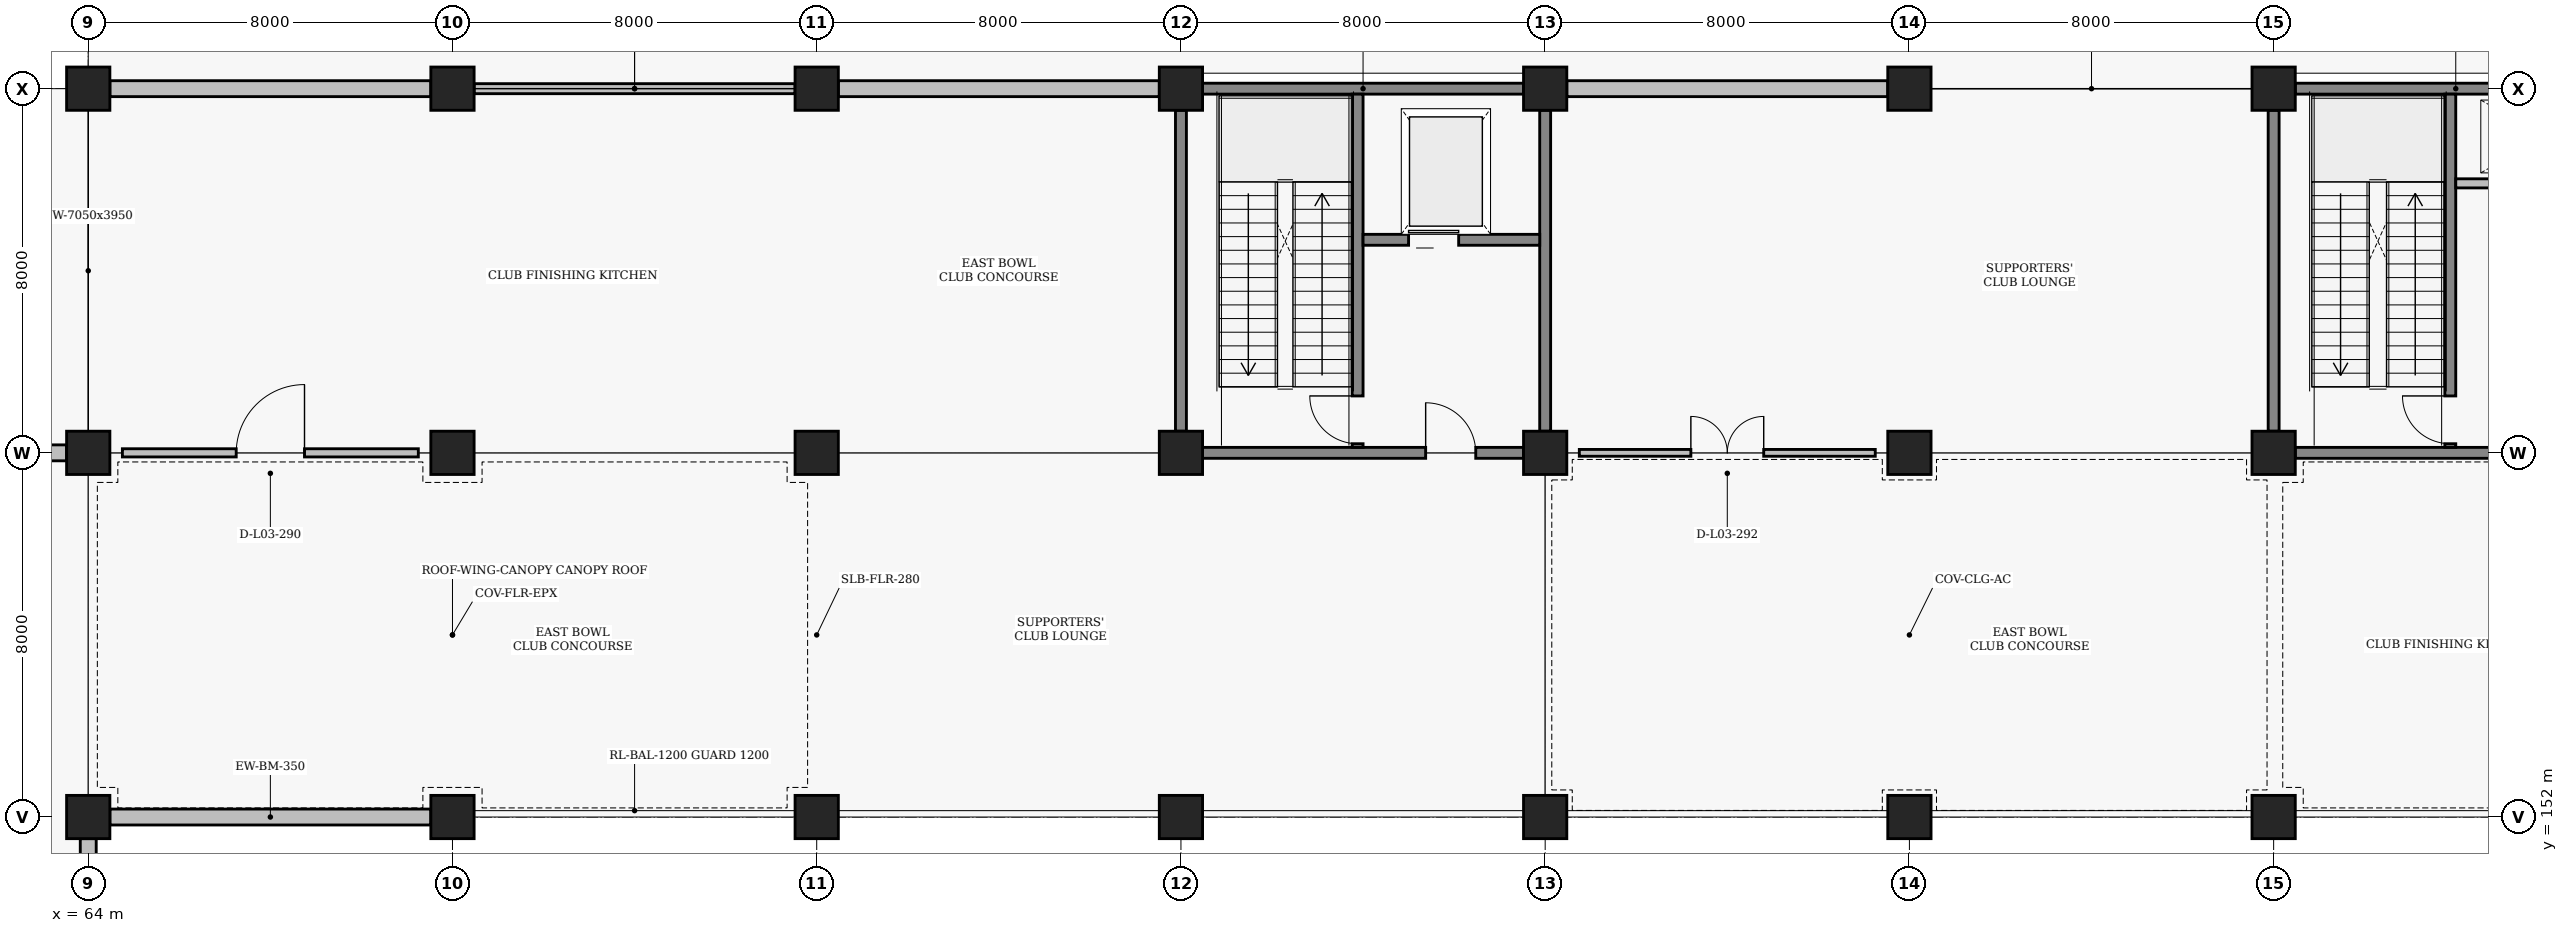
"""IFC4 building model, lengths in metres.
Left out: names, types, materials, properties, quantities, classifications, styles, units other than length and angle.
Written with IfcOpenShell. Run it as: python <this file> out.ifc"""

import sys

from ifc_helpers import new_model, si_unit, direction, frame, frame_2d, origin, origin_2d, place, context, subcontext, project, spatial, rectangle, extrude, element, fill, save


model = new_model("IFC4")
c1 = context("Model", 3, precision=1e-05, world=origin(), true_north=direction((0.0, 1.0)))
c2 = subcontext(c1, "Body", "Model", "MODEL_VIEW")
j1 = project(units=[si_unit("LENGTHUNIT", "METRE"), si_unit("PLANEANGLEUNIT", "RADIAN")], contexts=[c1])
p1 = place(None, origin())
s1 = spatial("IfcSite", under=j1, at=p1, CompositionType="ELEMENT")
p2 = place(p1, origin())
s2 = spatial("IfcBuilding", under=s1, at=p2, CompositionType="ELEMENT")
p3 = place(p2, frame((0.0, 0.0, 9.6)))
s3 = spatial("IfcBuildingStorey", under=s2, at=p3, CompositionType="ELEMENT", Elevation=9.6)
for number, where, z_axis, x_axis in (
    (1, (64.0, 152.0, 0.0), (0.0, 0.0, 1.0), (1.0, 0.0, 0.0)),
    (2, (64.0, 160.0, 0.0), (0.0, 0.0, 1.0), (1.0, 0.0, 0.0)),
    (3, (64.0, 168.0, 0.0), (0.0, 0.0, 1.0), (1.0, 0.0, 0.0)),
    (4, (72.0, 152.0, 0.0), (0.0, 0.0, 1.0), (1.0, 0.0, 0.0)),
    (5, (72.0, 160.0, 0.0), (0.0, 0.0, 1.0), (1.0, 0.0, 0.0)),
    (6, (72.0, 168.0, 0.0), (0.0, 0.0, 1.0), (1.0, 0.0, 0.0)),
    (7, (80.0, 152.0, 0.0), (0.0, 0.0, 1.0), (1.0, 0.0, 0.0)),
    (8, (80.0, 160.0, 0.0), (0.0, 0.0, 1.0), (1.0, 0.0, 0.0)),
    (9, (80.0, 168.0, 0.0), (0.0, 0.0, 1.0), (1.0, 0.0, 0.0)),
    (10, (88.0, 152.0, 0.0), (0.0, 0.0, 1.0), (1.0, 0.0, 0.0)),
    (11, (88.0, 160.0, 0.0), (0.0, 0.0, 1.0), (1.0, 0.0, 0.0)),
    (12, (88.0, 168.0, 0.0), (0.0, 0.0, 1.0), (1.0, 0.0, 0.0)),
    (13, (96.0, 152.0, 0.0), (0.0, 0.0, 1.0), (1.0, 0.0, 0.0)),
    (14, (96.0, 160.0, 0.0), (0.0, 0.0, 1.0), (1.0, 0.0, 0.0)),
    (15, (96.0, 168.0, 0.0), (0.0, 0.0, 1.0), (1.0, 0.0, 0.0)),
    (16, (104.0, 152.0, 0.0), (0.0, 0.0, 1.0), (1.0, 0.0, 0.0)),
    (17, (104.0, 160.0, 0.0), (0.0, 0.0, 1.0), (1.0, 0.0, 0.0)),
    (18, (104.0, 168.0, 0.0), (0.0, 0.0, 1.0), (1.0, 0.0, 0.0)),
    (19, (112.0, 152.0, 0.0), (0.0, 0.0, 1.0), (1.0, 0.0, 0.0)),
    (20, (112.0, 160.0, 0.0), (0.0, 0.0, 1.0), (1.0, 0.0, 0.0)),
    (21, (112.0, 168.0, 0.0), (0.0, 0.0, 1.0), (1.0, 0.0, 0.0)),
):
    element("IfcColumn", number, at=place(p3, frame(where, z_axis=z_axis, x_axis=x_axis)), inside=s3, PredefinedType="COLUMN", context=c2, shape_type="SweptSolid", body=[
        extrude(rectangle(XDim=0.95, YDim=0.95, at=origin_2d()), origin(), (0.0, 0.0, 1.0), 4.8),
    ])
p4 = place(p3, frame((64.0, 144.475, 0.0), z_axis=(0.0, 0.0, 1.0), x_axis=(0.0, 1.0, 0.0)))
e22 = element("IfcWall", 22, at=p4, inside=s3, PredefinedType="SOLIDWALL", context=c2, shape_type="SweptSolid", body=[
    extrude(rectangle(XDim=7.05, YDim=0.35, at=frame_2d((3.525, 0.0))), origin(), (0.0, 0.0, 1.0), 3.93),
])
p5 = place(p4, frame((2.775, 0.0, 0.95)))
e23 = element("IfcOpeningElement", 23, at=p5, cuts=e22, PredefinedType="OPENING", context=c2, shape_type="SweptSolid", body=[
    extrude(rectangle(XDim=1.5, YDim=1.6, at=frame_2d((0.75, 0.8))), frame((0.0, 0.185, 0.0), z_axis=(0.0, -1.0, 0.0), x_axis=(1.0, 0.0, 0.0)), (0.0, 0.0, 1.0), 0.37),
])
p6 = place(p3, frame((56.475, 160.0, 0.0), z_axis=(0.0, 0.0, 1.0), x_axis=(1.0, 0.0, 0.0)))
e24 = element("IfcWall", 24, at=p6, inside=s3, PredefinedType="SOLIDWALL", context=c2, shape_type="SweptSolid", body=[
    extrude(rectangle(XDim=7.05, YDim=0.35, at=frame_2d((3.525, 0.0))), origin(), (0.0, 0.0, 1.0), 3.95),
])
for number, where, z_axis, x_axis in (
    (25, (64.475, 152.0, 0.0), (0.0, 0.0, 1.0), (1.0, 0.0, 0.0)),
    (26, (64.475, 168.0, 0.0), (0.0, 0.0, 1.0), (1.0, 0.0, 0.0)),
):
    element("IfcWall", number, at=place(p3, frame(where, z_axis=z_axis, x_axis=x_axis)), inside=s3, PredefinedType="SOLIDWALL", context=c2, shape_type="SweptSolid", body=[
        extrude(rectangle(XDim=7.05, YDim=0.35, at=frame_2d((3.525, 0.0))), origin(), (0.0, 0.0, 1.0), 3.93),
    ])
p7 = place(p3, frame((72.475, 168.0, 0.0), z_axis=(0.0, 0.0, 1.0), x_axis=(1.0, 0.0, 0.0)))
e27 = element("IfcWall", 27, at=p7, inside=s3, PredefinedType="PARAPET", context=c2, shape_type="SweptSolid", body=[
    extrude(rectangle(XDim=7.05, YDim=0.22, at=frame_2d((3.525, 0.0))), origin(), (0.0, 0.0, 1.0), 0.16),
])
for number, where, z_axis, x_axis in (
    (28, (80.475, 168.0, 0.0), (0.0, 0.0, 1.0), (1.0, 0.0, 0.0)),
    (29, (96.475, 168.0, 0.0), (0.0, 0.0, 1.0), (1.0, 0.0, 0.0)),
):
    element("IfcWall", number, at=place(p3, frame(where, z_axis=z_axis, x_axis=x_axis)), inside=s3, PredefinedType="SOLIDWALL", context=c2, shape_type="SweptSolid", body=[
        extrude(rectangle(XDim=7.05, YDim=0.35, at=frame_2d((3.525, 0.0))), origin(), (0.0, 0.0, 1.0), 3.93),
    ])
p8 = place(p3, frame((88.475, 160.0, 0.0), z_axis=(0.0, 0.0, 1.0), x_axis=(1.0, 0.0, 0.0)))
e30 = element("IfcWall", 30, at=p8, inside=s3, PredefinedType="SHEAR", context=c2, shape_type="SweptSolid", body=[
    extrude(rectangle(XDim=7.05, YDim=0.24, at=frame_2d((3.525, 0.0))), origin(), (0.0, 0.0, 1.0), 3.68),
])
p9 = place(p8, frame((4.9, 0.0, 0.0)))
e31 = element("IfcOpeningElement", 31, at=p9, cuts=e30, PredefinedType="OPENING", context=c2, shape_type="SweptSolid", body=[
    extrude(rectangle(XDim=1.1, YDim=2.2, at=frame_2d((0.55, 1.1))), frame((0.0, 0.13, 0.0), z_axis=(0.0, -1.0, 0.0), x_axis=(1.0, 0.0, 0.0)), (0.0, 0.0, 1.0), 0.26),
])
for number, where, z_axis, x_axis in (
    (32, (88.475, 168.0, 0.0), (0.0, 0.0, 1.0), (1.0, 0.0, 0.0)),
    (33, (88.0, 160.475, 0.0), (0.0, 0.0, 1.0), (0.0, 1.0, 0.0)),
):
    element("IfcWall", number, at=place(p3, frame(where, z_axis=z_axis, x_axis=x_axis)), inside=s3, PredefinedType="SHEAR", context=c2, shape_type="SweptSolid", body=[
        extrude(rectangle(XDim=7.05, YDim=0.24, at=frame_2d((3.525, 0.0))), origin(), (0.0, 0.0, 1.0), 3.93),
    ])
p10 = place(p3, frame((96.0, 160.475, 0.0), z_axis=(0.0, 0.0, 1.0), x_axis=(0.0, 1.0, 0.0)))
e34 = element("IfcWall", 34, at=p10, inside=s3, PredefinedType="SHEAR", context=c2, shape_type="SweptSolid", body=[
    extrude(rectangle(XDim=7.05, YDim=0.24, at=frame_2d((3.525, 0.0))), origin(), (0.0, 0.0, 1.0), 3.68),
])
p11 = place(p3, frame((91.88, 160.12, 0.0), z_axis=(0.0, 0.0, 1.0), x_axis=(0.0, 1.0, 0.0)))
e35 = element("IfcWall", 35, at=p11, inside=s3, PredefinedType="SHEAR", context=c2, shape_type="SweptSolid", body=[
    extrude(rectangle(XDim=7.76, YDim=0.24, at=frame_2d((3.88, 0.0))), origin(), (0.0, 0.0, 1.0), 4.03),
])
p12 = place(p11, frame((0.08, 0.0, 0.0)))
e36 = element("IfcOpeningElement", 36, at=p12, cuts=e35, PredefinedType="OPENING", context=c2, shape_type="SweptSolid", body=[
    extrude(rectangle(XDim=1.05, YDim=2.15, at=frame_2d((0.525, 1.075))), frame((0.0, 0.13, 0.0), z_axis=(0.0, -1.0, 0.0), x_axis=(1.0, 0.0, 0.0)), (0.0, 0.0, 1.0), 0.26),
])
p13 = place(p3, frame((92.0, 164.68, 0.0), z_axis=(0.0, 0.0, 1.0), x_axis=(1.0, 0.0, 0.0)))
e37 = element("IfcWall", 37, at=p13, inside=s3, PredefinedType="SHEAR", context=c2, shape_type="SweptSolid", body=[
    extrude(rectangle(XDim=3.88, YDim=0.24, at=frame_2d((1.94, 0.0))), origin(), (0.0, 0.0, 1.0), 3.93),
])
p14 = place(p13, frame((1.0, 0.0, 0.0)))
e38 = element("IfcOpeningElement", 38, at=p14, cuts=e37, PredefinedType="OPENING", context=c2, shape_type="SweptSolid", body=[
    extrude(rectangle(XDim=1.1, YDim=2.15, at=frame_2d((0.55, 1.075))), frame((0.0, 0.13, 0.0), z_axis=(0.0, -1.0, 0.0), x_axis=(1.0, 0.0, 0.0)), (0.0, 0.0, 1.0), 0.26),
])
p15 = place(p3, frame((112.475, 160.0, 0.0), z_axis=(0.0, 0.0, 1.0), x_axis=(1.0, 0.0, 0.0)))
e39 = element("IfcWall", 39, at=p15, inside=s3, PredefinedType="SHEAR", context=c2, shape_type="SweptSolid", body=[
    extrude(rectangle(XDim=7.05, YDim=0.24, at=frame_2d((3.525, 0.0))), origin(), (0.0, 0.0, 1.0), 3.93),
])
p16 = place(p15, frame((4.9, 0.0, 0.0)))
e40 = element("IfcOpeningElement", 40, at=p16, cuts=e39, PredefinedType="OPENING", context=c2, shape_type="SweptSolid", body=[
    extrude(rectangle(XDim=1.1, YDim=2.2, at=frame_2d((0.55, 1.1))), frame((0.0, 0.13, 0.0), z_axis=(0.0, -1.0, 0.0), x_axis=(1.0, 0.0, 0.0)), (0.0, 0.0, 1.0), 0.26),
])
for number, where, z_axis, x_axis in (
    (41, (112.475, 168.0, 0.0), (0.0, 0.0, 1.0), (1.0, 0.0, 0.0)),
    (42, (112.0, 160.475, 0.0), (0.0, 0.0, 1.0), (0.0, 1.0, 0.0)),
):
    element("IfcWall", number, at=place(p3, frame(where, z_axis=z_axis, x_axis=x_axis)), inside=s3, PredefinedType="SHEAR", context=c2, shape_type="SweptSolid", body=[
        extrude(rectangle(XDim=7.05, YDim=0.24, at=frame_2d((3.525, 0.0))), origin(), (0.0, 0.0, 1.0), 3.93),
    ])
p17 = place(p3, frame((115.88, 160.12, 0.0), z_axis=(0.0, 0.0, 1.0), x_axis=(0.0, 1.0, 0.0)))
e43 = element("IfcWall", 43, at=p17, inside=s3, PredefinedType="SHEAR", context=c2, shape_type="SweptSolid", body=[
    extrude(rectangle(XDim=7.76, YDim=0.24, at=frame_2d((3.88, 0.0))), origin(), (0.0, 0.0, 1.0), 4.03),
])
p18 = place(p17, frame((0.08, 0.0, 0.0)))
e44 = element("IfcOpeningElement", 44, at=p18, cuts=e43, PredefinedType="OPENING", context=c2, shape_type="SweptSolid", body=[
    extrude(rectangle(XDim=1.05, YDim=2.15, at=frame_2d((0.525, 1.075))), frame((0.0, 0.13, 0.0), z_axis=(0.0, -1.0, 0.0), x_axis=(1.0, 0.0, 0.0)), (0.0, 0.0, 1.0), 0.26),
])
p19 = place(p3, frame((116.0, 165.92, 0.0), z_axis=(0.0, 0.0, 1.0), x_axis=(1.0, 0.0, 0.0)))
e45 = element("IfcWall", 45, at=p19, inside=s3, PredefinedType="PARTITIONING", context=c2, shape_type="SweptSolid", body=[
    extrude(rectangle(XDim=3.88, YDim=0.2, at=frame_2d((1.94, 0.0))), origin(), (0.0, 0.0, 1.0), 3.93),
])
p20 = place(p19, frame((1.25, 0.0, 0.0)))
e46 = element("IfcOpeningElement", 46, at=p20, cuts=e45, PredefinedType="OPENING", context=c2, shape_type="SweptSolid", body=[
    extrude(rectangle(XDim=0.85, YDim=2.05, at=frame_2d((0.425, 1.025))), frame((0.0, 0.11, 0.0), z_axis=(0.0, -1.0, 0.0), x_axis=(1.0, 0.0, 0.0)), (0.0, 0.0, 1.0), 0.22),
])
p21 = place(p3, frame((64.75, 160.0, 0.0), z_axis=(0.0, 0.0, 1.0), x_axis=(1.0, 0.0, 0.0)))
e47 = element("IfcWall", 47, at=p21, inside=s3, PredefinedType="PARTITIONING", context=c2, shape_type="SweptSolid", body=[
    extrude(rectangle(XDim=6.5, YDim=0.18, at=frame_2d((3.25, 0.0))), origin(), (0.0, 0.0, 1.0), 3.97),
])
p22 = place(p21, frame((2.5, 0.0, 0.0)))
e48 = element("IfcOpeningElement", 48, at=p22, cuts=e47, PredefinedType="OPENING", context=c2, shape_type="SweptSolid", body=[
    extrude(rectangle(XDim=1.5, YDim=2.2, at=frame_2d((0.75, 1.1))), frame((0.0, 0.1, 0.0), z_axis=(0.0, -1.0, 0.0), x_axis=(1.0, 0.0, 0.0)), (0.0, 0.0, 1.0), 0.2),
])
p23 = place(p3, frame((96.75, 160.0, 0.0), z_axis=(0.0, 0.0, 1.0), x_axis=(1.0, 0.0, 0.0)))
e49 = element("IfcWall", 49, at=p23, inside=s3, PredefinedType="PARTITIONING", context=c2, shape_type="SweptSolid", body=[
    extrude(rectangle(XDim=6.5, YDim=0.15, at=frame_2d((3.25, 0.0))), origin(), (0.0, 0.0, 1.0), 3.68),
])
p24 = place(p23, frame((2.45, 0.0, 0.0)))
e50 = element("IfcOpeningElement", 50, at=p24, cuts=e49, PredefinedType="OPENING", context=c2, shape_type="SweptSolid", body=[
    extrude(rectangle(XDim=1.6, YDim=2.2, at=frame_2d((0.8, 1.1))), frame((0.0, 0.085, 0.0), z_axis=(0.0, -1.0, 0.0), x_axis=(1.0, 0.0, 0.0)), (0.0, 0.0, 1.0), 0.17),
])
p25 = place(p9, origin())
e51 = element("IfcDoor", 51, at=p25, inside=s3, OperationType="SINGLE_SWING_LEFT", PredefinedType="DOOR", context=c2, shape_type="SweptSolid", body=[
    extrude(rectangle(XDim=1.1, YDim=2.2, at=frame_2d((0.55, 1.1))), frame((0.0, 0.025, 0.0), z_axis=(0.0, -1.0, 0.0), x_axis=(1.0, 0.0, 0.0)), (0.0, 0.0, 1.0), 0.05),
])
fill(e31, e51)
p26 = place(p12, origin())
e52 = element("IfcDoor", 52, at=p26, inside=s3, OperationType="SINGLE_SWING_RIGHT", PredefinedType="DOOR", context=c2, shape_type="SweptSolid", body=[
    extrude(rectangle(XDim=1.05, YDim=2.15, at=frame_2d((0.525, 1.075))), frame((0.0, 0.025, 0.0), z_axis=(0.0, -1.0, 0.0), x_axis=(1.0, 0.0, 0.0)), (0.0, 0.0, 1.0), 0.05),
])
fill(e36, e52)
p27 = place(p14, origin())
e53 = element("IfcDoor", 53, at=p27, inside=s3, OperationType="SLIDING_TO_LEFT", PredefinedType="DOOR", context=c2, shape_type="SweptSolid", body=[
    extrude(rectangle(XDim=1.1, YDim=2.15, at=frame_2d((0.55, 1.075))), frame((0.0, 0.025, 0.0), z_axis=(0.0, -1.0, 0.0), x_axis=(1.0, 0.0, 0.0)), (0.0, 0.0, 1.0), 0.05),
])
fill(e38, e53)
p28 = place(p18, origin())
e54 = element("IfcDoor", 54, at=p28, inside=s3, OperationType="SINGLE_SWING_RIGHT", PredefinedType="DOOR", context=c2, shape_type="SweptSolid", body=[
    extrude(rectangle(XDim=1.05, YDim=2.15, at=frame_2d((0.525, 1.075))), frame((0.0, 0.025, 0.0), z_axis=(0.0, -1.0, 0.0), x_axis=(1.0, 0.0, 0.0)), (0.0, 0.0, 1.0), 0.05),
])
fill(e44, e54)
p29 = place(p22, origin())
e55 = element("IfcDoor", 55, at=p29, inside=s3, OperationType="SINGLE_SWING_RIGHT", PredefinedType="DOOR", context=c2, shape_type="SweptSolid", body=[
    extrude(rectangle(XDim=1.5, YDim=2.2, at=frame_2d((0.75, 1.1))), frame((0.0, 0.025, 0.0), z_axis=(0.0, -1.0, 0.0), x_axis=(1.0, 0.0, 0.0)), (0.0, 0.0, 1.0), 0.05),
])
fill(e48, e55)
p30 = place(p24, origin())
e56 = element("IfcDoor", 56, at=p30, inside=s3, OperationType="DOUBLE_SWING_LEFT", PredefinedType="DOOR", context=c2, shape_type="SweptSolid", body=[
    extrude(rectangle(XDim=1.6, YDim=2.2, at=frame_2d((0.8, 1.1))), frame((0.0, 0.025, 0.0), z_axis=(0.0, -1.0, 0.0), x_axis=(1.0, 0.0, 0.0)), (0.0, 0.0, 1.0), 0.05),
])
fill(e50, e56)
save(model, sys.argv[1])
